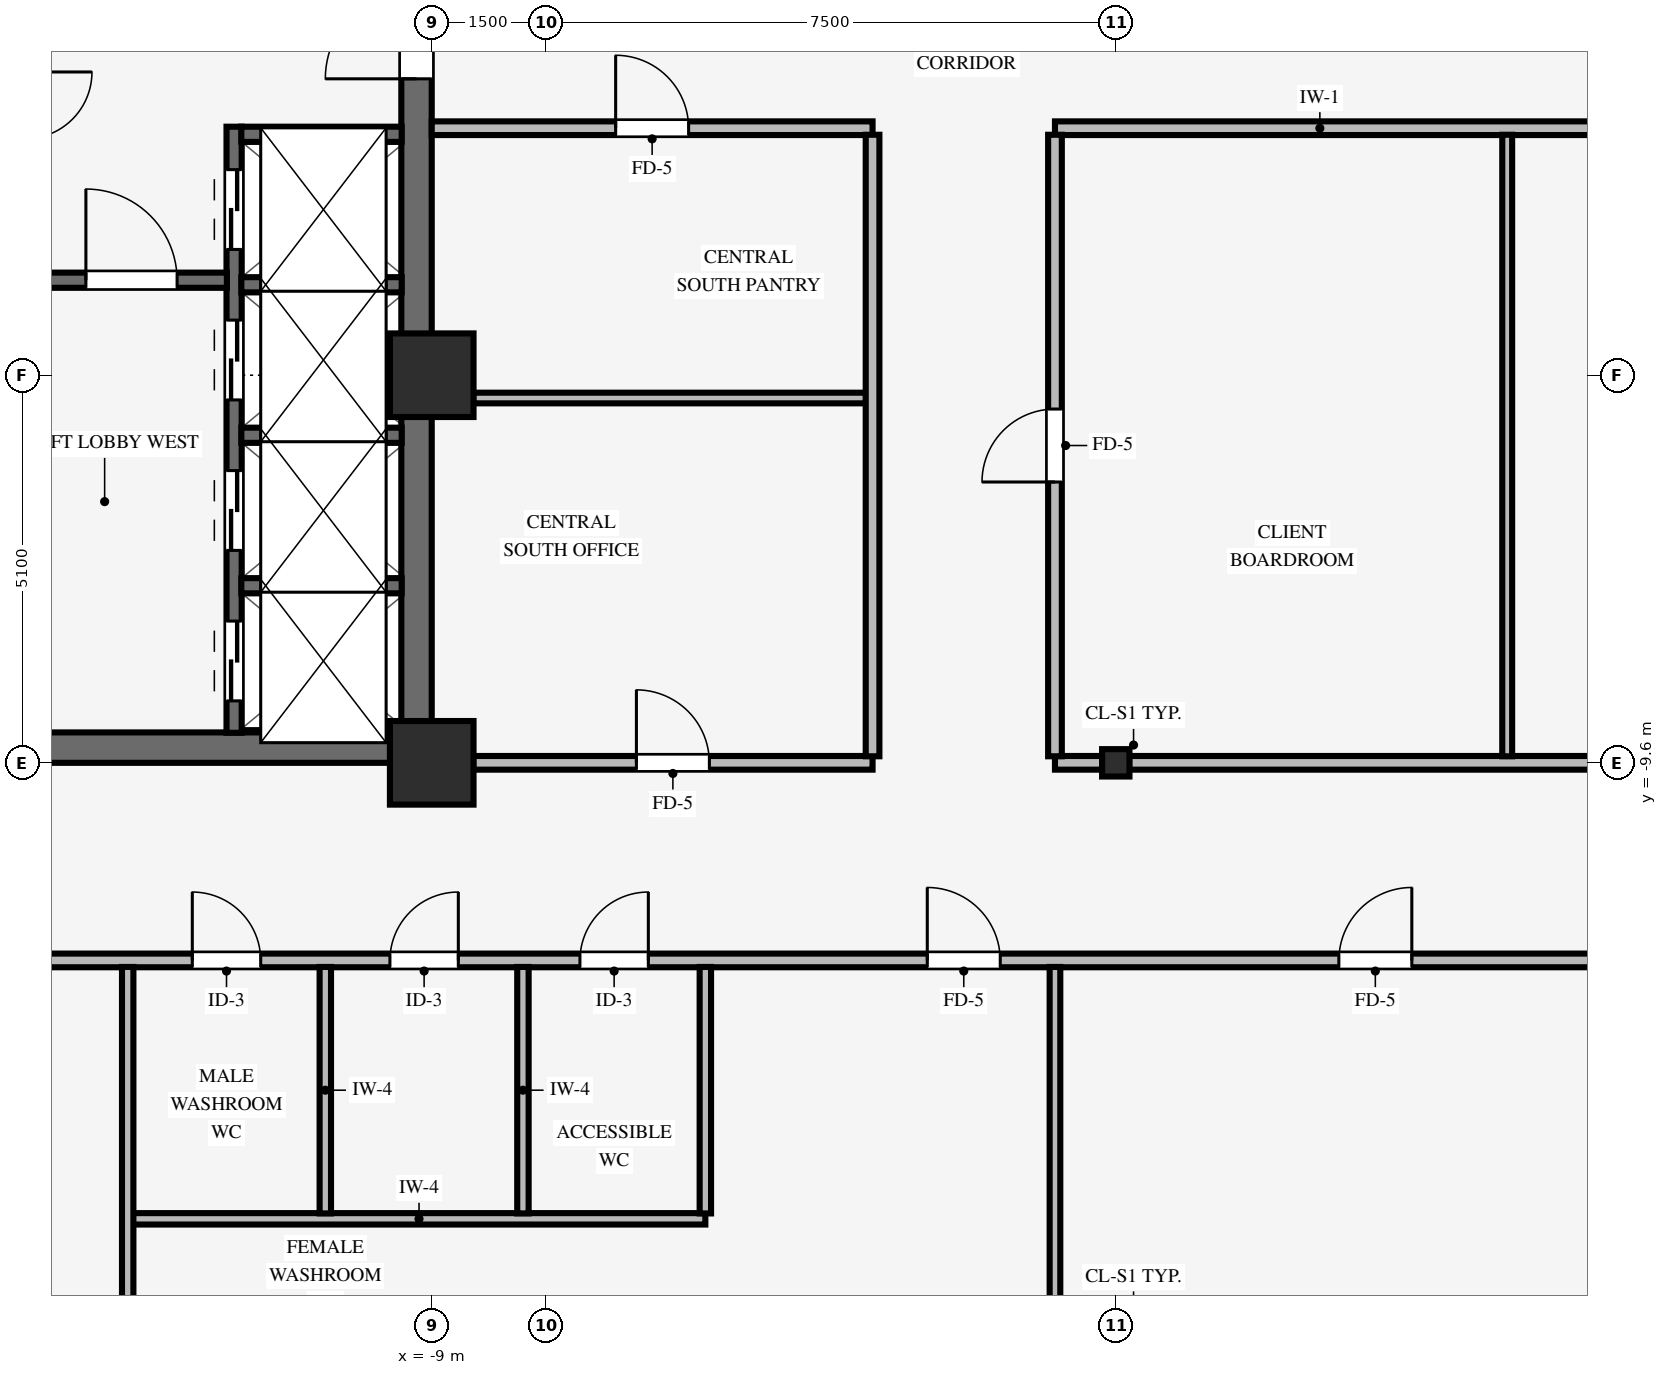
"""IFC4 building model, lengths in metres.
Left out: names, types, materials, properties, quantities, classifications, styles, units other than length and angle.
Written with IfcOpenShell. Run it as: python <this file> out.ifc"""

import sys

from ifc_helpers import new_model, si_unit, direction, frame, frame_2d, origin, origin_2d, place, context, subcontext, project, spatial, rectangle, i_section, extrude, source, transform, mapped, element, fill, save


model = new_model("IFC4")
c1 = context("Model", 3, precision=1e-05, world=origin(), true_north=direction((0.0, 1.0)))
c2 = subcontext(c1, "Body", "Model", "MODEL_VIEW")
j1 = project(units=[si_unit("LENGTHUNIT", "METRE"), si_unit("PLANEANGLEUNIT", "RADIAN")], contexts=[c1])
p1 = place(None, origin())
s1 = spatial("IfcSite", under=j1, at=p1, CompositionType="ELEMENT")
p2 = place(p1, origin())
s2 = spatial("IfcBuilding", under=s1, at=p2, CompositionType="ELEMENT")
p3 = place(p2, frame((0.0, 0.0, 112.9)))
s3 = spatial("IfcBuildingStorey", under=s2, at=p3, CompositionType="ELEMENT", Elevation=112.9)
p4 = place(p3, frame((-17.5, -9.4, 0.0), z_axis=(0.0, 0.0, 1.0), x_axis=(1.0, 0.0, 0.0)))
e1 = element("IfcWall", 1, at=p4, inside=s3, PredefinedType="SHEAR", context=c2, shape_type="SweptSolid", body=[
    extrude(rectangle(XDim=8.5, YDim=0.4, at=frame_2d((4.25, 0.0))), origin(), (0.0, 0.0, 1.0), 3.25),
])
p5 = place(p3, frame((-9.2, -9.205, 0.0), z_axis=(0.0, 0.0, 1.0), x_axis=(0.0, 1.0, 0.0)))
e2 = element("IfcWall", 2, at=p5, inside=s3, PredefinedType="SHEAR", context=c2, shape_type="SweptSolid", body=[
    extrude(rectangle(XDim=18.41, YDim=0.4, at=frame_2d((9.205, 0.0))), origin(), (0.0, 0.0, 1.0), 3.25),
])
p6 = place(p5, frame((8.605, 0.0, 0.0)))
e3 = element("IfcOpeningElement", 3, at=p6, cuts=e2, PredefinedType="OPENING", context=c2, shape_type="SweptSolid", body=[
    extrude(rectangle(XDim=1.2, YDim=2.15, at=frame_2d((0.6, 1.075))), frame((0.0, 0.21, 0.0), z_axis=(0.0, -1.0, 0.0), x_axis=(1.0, 0.0, 0.0)), (0.0, 0.0, 1.0), 0.42),
])
for number, where, z_axis, x_axis in (
    (4, (-9.0, -9.6, 0.0), (0.0, 0.0, 1.0), (1.0, 0.0, 0.0)),
    (5, (-9.0, -4.5, 0.0), (0.0, 0.0, 1.0), (1.0, 0.0, 0.0)),
):
    element("IfcColumn", number, at=place(p3, frame(where, z_axis=z_axis, x_axis=x_axis)), inside=s3, PredefinedType="COLUMN", context=c2, shape_type="SweptSolid", body=[
        extrude(rectangle(XDim=1.1, YDim=1.1, at=origin_2d()), origin(), (0.0, 0.0, 1.0), 3.25),
    ])
p7 = place(p3, frame((0.0, -9.6, 0.0), z_axis=(0.0, 0.0, 1.0), x_axis=(1.0, 0.0, 0.0)))
e6 = element("IfcColumn", 6, at=p7, inside=s3, PredefinedType="COLUMN", context=c2, shape_type="SweptSolid", body=[
    extrude(i_section(OverallWidth=0.36, OverallDepth=0.36, WebThickness=0.021, FlangeThickness=0.021, FilletRadius=0.018, at=origin_2d()), origin(), (0.0, 0.0, 1.0), 3.25),
])
p8 = place(p3, frame((-11.6, -9.205, 0.0), z_axis=(0.0, 0.0, 1.0), x_axis=(0.0, 1.0, 0.0)))
e7 = element("IfcWall", 7, at=p8, inside=s3, PredefinedType="SHEAR", context=c2, shape_type="SweptSolid", body=[
    extrude(rectangle(XDim=7.975, YDim=0.2, at=frame_2d((3.988, 0.0))), origin(), (0.0, 0.0, 1.0), 3.25),
])
p9 = place(p8, frame((0.42, 0.0, 0.0)))
e8 = element("IfcOpeningElement", 8, at=p9, cuts=e7, PredefinedType="OPENING", context=c2, shape_type="SweptSolid", body=[
    extrude(rectangle(XDim=1.05, YDim=2.15, at=frame_2d((0.525, 1.075))), frame((0.0, 0.11, 0.0), z_axis=(0.0, -1.0, 0.0), x_axis=(1.0, 0.0, 0.0)), (0.0, 0.0, 1.0), 0.22),
])
p10 = place(p8, frame((2.4, 0.0, 0.0)))
e9 = element("IfcOpeningElement", 9, at=p10, cuts=e7, PredefinedType="OPENING", context=c2, shape_type="SweptSolid", body=[
    extrude(rectangle(XDim=1.05, YDim=2.15, at=frame_2d((0.525, 1.075))), frame((0.0, 0.11, 0.0), z_axis=(0.0, -1.0, 0.0), x_axis=(1.0, 0.0, 0.0)), (0.0, 0.0, 1.0), 0.22),
])
p11 = place(p8, frame((4.38, 0.0, 0.0)))
e10 = element("IfcOpeningElement", 10, at=p11, cuts=e7, PredefinedType="OPENING", context=c2, shape_type="SweptSolid", body=[
    extrude(rectangle(XDim=1.05, YDim=2.15, at=frame_2d((0.525, 1.075))), frame((0.0, 0.11, 0.0), z_axis=(0.0, -1.0, 0.0), x_axis=(1.0, 0.0, 0.0)), (0.0, 0.0, 1.0), 0.22),
])
p12 = place(p8, frame((6.36, 0.0, 0.0)))
e11 = element("IfcOpeningElement", 11, at=p12, cuts=e7, PredefinedType="OPENING", context=c2, shape_type="SweptSolid", body=[
    extrude(rectangle(XDim=1.05, YDim=2.15, at=frame_2d((0.525, 1.075))), frame((0.0, 0.11, 0.0), z_axis=(0.0, -1.0, 0.0), x_axis=(1.0, 0.0, 0.0)), (0.0, 0.0, 1.0), 0.22),
])
p13 = place(p3, frame((-14.255, -3.25, 0.0), z_axis=(0.0, 0.0, 1.0), x_axis=(1.0, 0.0, 0.0)))
e12 = element("IfcWall", 12, at=p13, inside=s3, PredefinedType="SHEAR", context=c2, shape_type="SweptSolid", body=[
    extrude(rectangle(XDim=2.56, YDim=0.2, at=frame_2d((1.28, 0.0))), origin(), (0.0, 0.0, 1.0), 3.25),
])
p14 = place(p13, frame((0.705, 0.0, 0.0)))
e13 = element("IfcOpeningElement", 13, at=p14, cuts=e12, PredefinedType="OPENING", context=c2, shape_type="SweptSolid", body=[
    extrude(rectangle(XDim=1.2, YDim=2.15, at=frame_2d((0.6, 1.075))), frame((0.0, 0.11, 0.0), z_axis=(0.0, -1.0, 0.0), x_axis=(1.0, 0.0, 0.0)), (0.0, 0.0, 1.0), 0.22),
])
for number, where, z_axis, x_axis in (
    (14, (-11.505, -7.27, 0.0), (0.0, 0.0, 1.0), (1.0, 0.0, 0.0)),
    (15, (-11.505, -5.29, 0.0), (0.0, 0.0, 1.0), (1.0, 0.0, 0.0)),
    (16, (-11.505, -3.31, 0.0), (0.0, 0.0, 1.0), (1.0, 0.0, 0.0)),
    (17, (-11.505, -1.33, 0.0), (0.0, 0.0, 1.0), (1.0, 0.0, 0.0)),
):
    element("IfcWall", number, at=place(p3, frame(where, z_axis=z_axis, x_axis=x_axis)), inside=s3, PredefinedType="SHEAR", context=c2, shape_type="SweptSolid", body=[
        extrude(rectangle(XDim=2.11, YDim=0.2, at=frame_2d((1.055, 0.0))), origin(), (0.0, 0.0, 1.0), 3.25),
    ])
p15 = place(p3, frame((-12.934, -15.6, 0.0), z_axis=(0.0, 0.0, 1.0), x_axis=(1.0, 0.0, 0.0)))
e18 = element("IfcWall", 18, at=p15, inside=s3, PredefinedType="PARTITIONING", context=c2, shape_type="SweptSolid", body=[
    extrude(rectangle(XDim=7.534, YDim=0.15, at=frame_2d((3.767, 0.0))), origin(), (0.0, 0.0, 1.0), 3.24),
])
p16 = place(p3, frame((-15.0, -12.2, 0.0), z_axis=(0.0, 0.0, 1.0), x_axis=(1.0, 0.0, 0.0)))
e19 = element("IfcWall", 19, at=p16, inside=s3, PredefinedType="PARTITIONING", context=c2, shape_type="SweptSolid", body=[
    extrude(rectangle(XDim=30.0, YDim=0.18, at=frame_2d((15.0, 0.0))), origin(), (0.0, 0.0, 1.0), 3.24),
])
p17 = place(p16, frame((17.935, 0.0, 0.0)))
e20 = element("IfcOpeningElement", 20, at=p17, cuts=e19, PredefinedType="OPENING", context=c2, shape_type="SweptSolid", body=[
    extrude(rectangle(XDim=0.96, YDim=2.1, at=frame_2d((0.48, 1.05))), frame((0.0, 0.1, 0.0), z_axis=(0.0, -1.0, 0.0), x_axis=(1.0, 0.0, 0.0)), (0.0, 0.0, 1.0), 0.2),
])
p18 = place(p16, frame((25.835, 0.0, 0.0)))
e21 = element("IfcOpeningElement", 21, at=p18, cuts=e19, PredefinedType="OPENING", context=c2, shape_type="SweptSolid", body=[
    extrude(rectangle(XDim=0.96, YDim=2.1, at=frame_2d((0.48, 1.05))), frame((0.0, 0.1, 0.0), z_axis=(0.0, -1.0, 0.0), x_axis=(1.0, 0.0, 0.0)), (0.0, 0.0, 1.0), 0.2),
])
p19 = place(p16, frame((5.45, 0.0, 0.0)))
e22 = element("IfcOpeningElement", 22, at=p19, cuts=e19, PredefinedType="OPENING", context=c2, shape_type="SweptSolid", body=[
    extrude(rectangle(XDim=0.9, YDim=2.1, at=frame_2d((0.45, 1.05))), frame((0.0, 0.1, 0.0), z_axis=(0.0, -1.0, 0.0), x_axis=(1.0, 0.0, 0.0)), (0.0, 0.0, 1.0), 0.2),
])
p20 = place(p16, frame((2.85, 0.0, 0.0)))
e23 = element("IfcOpeningElement", 23, at=p20, cuts=e19, PredefinedType="OPENING", context=c2, shape_type="SweptSolid", body=[
    extrude(rectangle(XDim=0.9, YDim=2.1, at=frame_2d((0.45, 1.05))), frame((0.0, 0.1, 0.0), z_axis=(0.0, -1.0, 0.0), x_axis=(1.0, 0.0, 0.0)), (0.0, 0.0, 1.0), 0.2),
])
p21 = place(p16, frame((12.52, 0.0, 0.0)))
e24 = element("IfcOpeningElement", 24, at=p21, cuts=e19, PredefinedType="OPENING", context=c2, shape_type="SweptSolid", body=[
    extrude(rectangle(XDim=0.96, YDim=2.1, at=frame_2d((0.48, 1.05))), frame((0.0, 0.1, 0.0), z_axis=(0.0, -1.0, 0.0), x_axis=(1.0, 0.0, 0.0)), (0.0, 0.0, 1.0), 0.2),
])
p22 = place(p16, frame((7.95, 0.0, 0.0)))
e25 = element("IfcOpeningElement", 25, at=p22, cuts=e19, PredefinedType="OPENING", context=c2, shape_type="SweptSolid", body=[
    extrude(rectangle(XDim=0.9, YDim=2.1, at=frame_2d((0.45, 1.05))), frame((0.0, 0.1, 0.0), z_axis=(0.0, -1.0, 0.0), x_axis=(1.0, 0.0, 0.0)), (0.0, 0.0, 1.0), 0.2),
])
p23 = place(p3, frame((-8.454, -9.6, 0.0), z_axis=(0.0, 0.0, 1.0), x_axis=(1.0, 0.0, 0.0)))
e26 = element("IfcWall", 26, at=p23, inside=s3, PredefinedType="PARTITIONING", context=c2, shape_type="SweptSolid", body=[
    extrude(rectangle(XDim=5.254, YDim=0.18, at=frame_2d((2.627, 0.0))), origin(), (0.0, 0.0, 1.0), 2.285),
])
p24 = place(p23, frame((2.147, 0.0, 0.0)))
e27 = element("IfcOpeningElement", 27, at=p24, cuts=e26, PredefinedType="OPENING", context=c2, shape_type="SweptSolid", body=[
    extrude(rectangle(XDim=0.96, YDim=2.1, at=frame_2d((0.48, 1.05))), frame((0.0, 0.1, 0.0), z_axis=(0.0, -1.0, 0.0), x_axis=(1.0, 0.0, 0.0)), (0.0, 0.0, 1.0), 0.2),
])
p25 = place(p3, frame((-0.8, -9.6, 0.0), z_axis=(0.0, 0.0, 1.0), x_axis=(1.0, 0.0, 0.0)))
e28 = element("IfcWall", 28, at=p25, inside=s3, PredefinedType="PARTITIONING", context=c2, shape_type="SweptSolid", body=[
    extrude(rectangle(XDim=0.624, YDim=0.18, at=frame_2d((0.312, 0.0))), origin(), (0.0, 0.0, 1.0), 2.285),
])
p26 = place(p3, frame((0.176, -9.6, 0.0), z_axis=(0.0, 0.0, 1.0), x_axis=(1.0, 0.0, 0.0)))
e29 = element("IfcWall", 29, at=p26, inside=s3, PredefinedType="PARTITIONING", context=c2, shape_type="SweptSolid", body=[
    extrude(rectangle(XDim=8.278, YDim=0.18, at=frame_2d((4.139, 0.0))), origin(), (0.0, 0.0, 1.0), 2.285),
])
p27 = place(p3, frame((-8.454, -4.8, 0.0), z_axis=(0.0, 0.0, 1.0), x_axis=(1.0, 0.0, 0.0)))
e30 = element("IfcWall", 30, at=p27, inside=s3, PredefinedType="PARTITIONING", context=c2, shape_type="SweptSolid", body=[
    extrude(rectangle(XDim=5.168, YDim=0.14, at=frame_2d((2.584, 0.0))), origin(), (0.0, 0.0, 1.0), 2.618),
])
p28 = place(p3, frame((-9.0, -1.25, 0.0), z_axis=(0.0, 0.0, 1.0), x_axis=(1.0, 0.0, 0.0)))
e31 = element("IfcWall", 31, at=p28, inside=s3, PredefinedType="PARTITIONING", context=c2, shape_type="SweptSolid", body=[
    extrude(rectangle(XDim=5.8, YDim=0.18, at=frame_2d((2.9, 0.0))), origin(), (0.0, 0.0, 1.0), 3.24),
])
p29 = place(p28, frame((2.42, 0.0, 0.0)))
e32 = element("IfcOpeningElement", 32, at=p29, cuts=e31, PredefinedType="OPENING", context=c2, shape_type="SweptSolid", body=[
    extrude(rectangle(XDim=0.96, YDim=2.1, at=frame_2d((0.48, 1.05))), frame((0.0, 0.1, 0.0), z_axis=(0.0, -1.0, 0.0), x_axis=(1.0, 0.0, 0.0)), (0.0, 0.0, 1.0), 0.2),
])
p30 = place(p3, frame((-0.8, -1.25, 0.0), z_axis=(0.0, 0.0, 1.0), x_axis=(1.0, 0.0, 0.0)))
e33 = element("IfcWall", 33, at=p30, inside=s3, PredefinedType="PARTITIONING", context=c2, shape_type="SweptSolid", body=[
    extrude(rectangle(XDim=9.8, YDim=0.18, at=frame_2d((4.9, 0.0))), origin(), (0.0, 0.0, 1.0), 3.24),
])
p31 = place(p30, frame((7.42, 0.0, 0.0)))
e34 = element("IfcOpeningElement", 34, at=p31, cuts=e33, PredefinedType="OPENING", context=c2, shape_type="SweptSolid", body=[
    extrude(rectangle(XDim=0.96, YDim=2.1, at=frame_2d((0.48, 1.05))), frame((0.0, 0.1, 0.0), z_axis=(0.0, -1.0, 0.0), x_axis=(1.0, 0.0, 0.0)), (0.0, 0.0, 1.0), 0.2),
])
p32 = place(p3, frame((-13.0, -22.88, 0.0), z_axis=(0.0, 0.0, 1.0), x_axis=(0.0, 1.0, 0.0)))
e35 = element("IfcWall", 35, at=p32, inside=s3, PredefinedType="PARTITIONING", context=c2, shape_type="SweptSolid", body=[
    extrude(rectangle(XDim=10.594, YDim=0.15, at=frame_2d((5.297, 0.0))), origin(), (0.0, 0.0, 1.0), 3.24),
])
for number, where, z_axis, x_axis in (
    (36, (-10.4, -15.529, 0.0), (0.0, 0.0, 1.0), (0.0, 1.0, 0.0)),
    (37, (-7.8, -15.529, 0.0), (0.0, 0.0, 1.0), (0.0, 1.0, 0.0)),
    (38, (-5.4, -15.529, 0.0), (0.0, 0.0, 1.0), (0.0, 1.0, 0.0)),
):
    element("IfcWall", number, at=place(p3, frame(where, z_axis=z_axis, x_axis=x_axis)), inside=s3, PredefinedType="PARTITIONING", context=c2, shape_type="SweptSolid", body=[
        extrude(rectangle(XDim=3.243, YDim=0.15, at=frame_2d((1.622, 0.0))), origin(), (0.0, 0.0, 1.0), 3.24),
    ])
p33 = place(p3, frame((-3.2, -9.514, 0.0), z_axis=(0.0, 0.0, 1.0), x_axis=(0.0, 1.0, 0.0)))
e39 = element("IfcWall", 39, at=p33, inside=s3, PredefinedType="PARTITIONING", context=c2, shape_type="SweptSolid", body=[
    extrude(rectangle(XDim=8.178, YDim=0.18, at=frame_2d((4.089, 0.0))), origin(), (0.0, 0.0, 1.0), 3.24),
])
p34 = place(p3, frame((-0.8, -22.88, 0.0), z_axis=(0.0, 0.0, 1.0), x_axis=(0.0, 1.0, 0.0)))
e40 = element("IfcWall", 40, at=p34, inside=s3, PredefinedType="PARTITIONING", context=c2, shape_type="SweptSolid", body=[
    extrude(rectangle(XDim=10.594, YDim=0.14, at=frame_2d((5.297, 0.0))), origin(), (0.0, 0.0, 1.0), 3.24),
])
p35 = place(p3, frame((-0.8, -9.514, 0.0), z_axis=(0.0, 0.0, 1.0), x_axis=(0.0, 1.0, 0.0)))
e41 = element("IfcWall", 41, at=p35, inside=s3, PredefinedType="PARTITIONING", context=c2, shape_type="SweptSolid", body=[
    extrude(rectangle(XDim=8.178, YDim=0.18, at=frame_2d((4.089, 0.0))), origin(), (0.0, 0.0, 1.0), 3.24),
])
p36 = place(p35, frame((3.609, 0.0, 0.0)))
e42 = element("IfcOpeningElement", 42, at=p36, cuts=e41, PredefinedType="OPENING", context=c2, shape_type="SweptSolid", body=[
    extrude(rectangle(XDim=0.96, YDim=2.1, at=frame_2d((0.48, 1.05))), frame((0.0, 0.1, 0.0), z_axis=(0.0, -1.0, 0.0), x_axis=(1.0, 0.0, 0.0)), (0.0, 0.0, 1.0), 0.2),
])
p37 = place(p3, frame((5.15, -9.514, 0.0), z_axis=(0.0, 0.0, 1.0), x_axis=(0.0, 1.0, 0.0)))
e43 = element("IfcWall", 43, at=p37, inside=s3, PredefinedType="PARTITIONING", context=c2, shape_type="SweptSolid", body=[
    extrude(rectangle(XDim=8.178, YDim=0.13, at=frame_2d((4.089, 0.0))), origin(), (0.0, 0.0, 1.0), 3.24),
])
m1 = source(origin(), c2, "Body", "SweptSolid", [
    extrude(rectangle(XDim=1.2, YDim=2.15, at=frame_2d((0.6, 1.075))), frame((0.0, 0.025, 0.0), z_axis=(0.0, -1.0, 0.0), x_axis=(1.0, 0.0, 0.0)), (0.0, 0.0, 1.0), 0.05),
])
p38 = place(p14, origin())
e44 = element("IfcDoor", 44, at=p38, inside=s3, OperationType="SINGLE_SWING_LEFT", PredefinedType="DOOR", context=c2, shape_type="MappedRepresentation", body=[
    mapped(m1, transform((0.0, 0.0, 0.0), scale=1.0)),
])
fill(e13, e44)
p39 = place(p6, origin())
e45 = element("IfcDoor", 45, at=p39, inside=s3, OperationType="SINGLE_SWING_LEFT", PredefinedType="DOOR", context=c2, shape_type="MappedRepresentation", body=[
    mapped(m1, transform((0.0, 0.0, 0.0), scale=1.0)),
])
fill(e3, e45)
m2 = source(origin(), c2, "Body", "SweptSolid", [
    extrude(rectangle(XDim=1.05, YDim=2.15, at=frame_2d((0.525, 1.075))), frame((0.0, 0.025, 0.0), z_axis=(0.0, -1.0, 0.0), x_axis=(1.0, 0.0, 0.0)), (0.0, 0.0, 1.0), 0.05),
])
p40 = place(p9, origin())
e46 = element("IfcDoor", 46, at=p40, inside=s3, OperationType="DOUBLE_DOOR_SLIDING", PredefinedType="DOOR", context=c2, shape_type="MappedRepresentation", body=[
    mapped(m2, transform((0.0, 0.0, 0.0), scale=1.0)),
])
fill(e8, e46)
p41 = place(p10, origin())
e47 = element("IfcDoor", 47, at=p41, inside=s3, OperationType="DOUBLE_DOOR_SLIDING", PredefinedType="DOOR", context=c2, shape_type="MappedRepresentation", body=[
    mapped(m2, transform((0.0, 0.0, 0.0), scale=1.0)),
])
fill(e9, e47)
p42 = place(p11, origin())
e48 = element("IfcDoor", 48, at=p42, inside=s3, OperationType="DOUBLE_DOOR_SLIDING", PredefinedType="DOOR", context=c2, shape_type="MappedRepresentation", body=[
    mapped(m2, transform((0.0, 0.0, 0.0), scale=1.0)),
])
fill(e10, e48)
p43 = place(p12, origin())
e49 = element("IfcDoor", 49, at=p43, inside=s3, OperationType="DOUBLE_DOOR_SLIDING", PredefinedType="DOOR", context=c2, shape_type="MappedRepresentation", body=[
    mapped(m2, transform((0.0, 0.0, 0.0), scale=1.0)),
])
fill(e11, e49)
m3 = source(origin(), c2, "Body", "SweptSolid", [
    extrude(rectangle(XDim=0.96, YDim=2.1, at=frame_2d((0.48, 1.05))), frame((0.0, 0.025, 0.0), z_axis=(0.0, -1.0, 0.0), x_axis=(1.0, 0.0, 0.0)), (0.0, 0.0, 1.0), 0.05),
])
p44 = place(p17, origin())
e50 = element("IfcDoor", 50, at=p44, inside=s3, OperationType="SINGLE_SWING_RIGHT", PredefinedType="DOOR", context=c2, shape_type="MappedRepresentation", body=[
    mapped(m3, transform((0.0, 0.0, 0.0), scale=1.0)),
])
fill(e20, e50)
p45 = place(p36, origin())
e51 = element("IfcDoor", 51, at=p45, inside=s3, OperationType="SINGLE_SWING_LEFT", PredefinedType="DOOR", context=c2, shape_type="MappedRepresentation", body=[
    mapped(m3, transform((0.0, 0.0, 0.0), scale=1.0)),
])
fill(e42, e51)
p46 = place(p29, origin())
e52 = element("IfcDoor", 52, at=p46, inside=s3, OperationType="SINGLE_SWING_LEFT", PredefinedType="DOOR", context=c2, shape_type="MappedRepresentation", body=[
    mapped(m3, transform((0.0, 0.0, 0.0), scale=1.0)),
])
fill(e32, e52)
p47 = place(p24, origin())
e53 = element("IfcDoor", 53, at=p47, inside=s3, OperationType="SINGLE_SWING_LEFT", PredefinedType="DOOR", context=c2, shape_type="MappedRepresentation", body=[
    mapped(m3, transform((0.0, 0.0, 0.0), scale=1.0)),
])
fill(e27, e53)
m4 = source(origin(), c2, "Body", "SweptSolid", [
    extrude(rectangle(XDim=0.9, YDim=2.1, at=frame_2d((0.45, 1.05))), frame((0.0, 0.025, 0.0), z_axis=(0.0, -1.0, 0.0), x_axis=(1.0, 0.0, 0.0)), (0.0, 0.0, 1.0), 0.05),
])
p48 = place(p19, origin())
e54 = element("IfcDoor", 54, at=p48, inside=s3, OperationType="SINGLE_SWING_RIGHT", PredefinedType="DOOR", context=c2, shape_type="MappedRepresentation", body=[
    mapped(m4, transform((0.0, 0.0, 0.0), scale=1.0)),
])
fill(e22, e54)
p49 = place(p20, origin())
e55 = element("IfcDoor", 55, at=p49, inside=s3, OperationType="SINGLE_SWING_LEFT", PredefinedType="DOOR", context=c2, shape_type="MappedRepresentation", body=[
    mapped(m4, transform((0.0, 0.0, 0.0), scale=1.0)),
])
fill(e23, e55)
p50 = place(p21, origin())
e56 = element("IfcDoor", 56, at=p50, inside=s3, OperationType="SINGLE_SWING_LEFT", PredefinedType="DOOR", context=c2, shape_type="MappedRepresentation", body=[
    mapped(m3, transform((0.0, 0.0, 0.0), scale=1.0)),
])
fill(e24, e56)
p51 = place(p22, origin())
e57 = element("IfcDoor", 57, at=p51, inside=s3, OperationType="SINGLE_SWING_RIGHT", PredefinedType="DOOR", context=c2, shape_type="MappedRepresentation", body=[
    mapped(m4, transform((0.0, 0.0, 0.0), scale=1.0)),
])
fill(e25, e57)
save(model, sys.argv[1])
